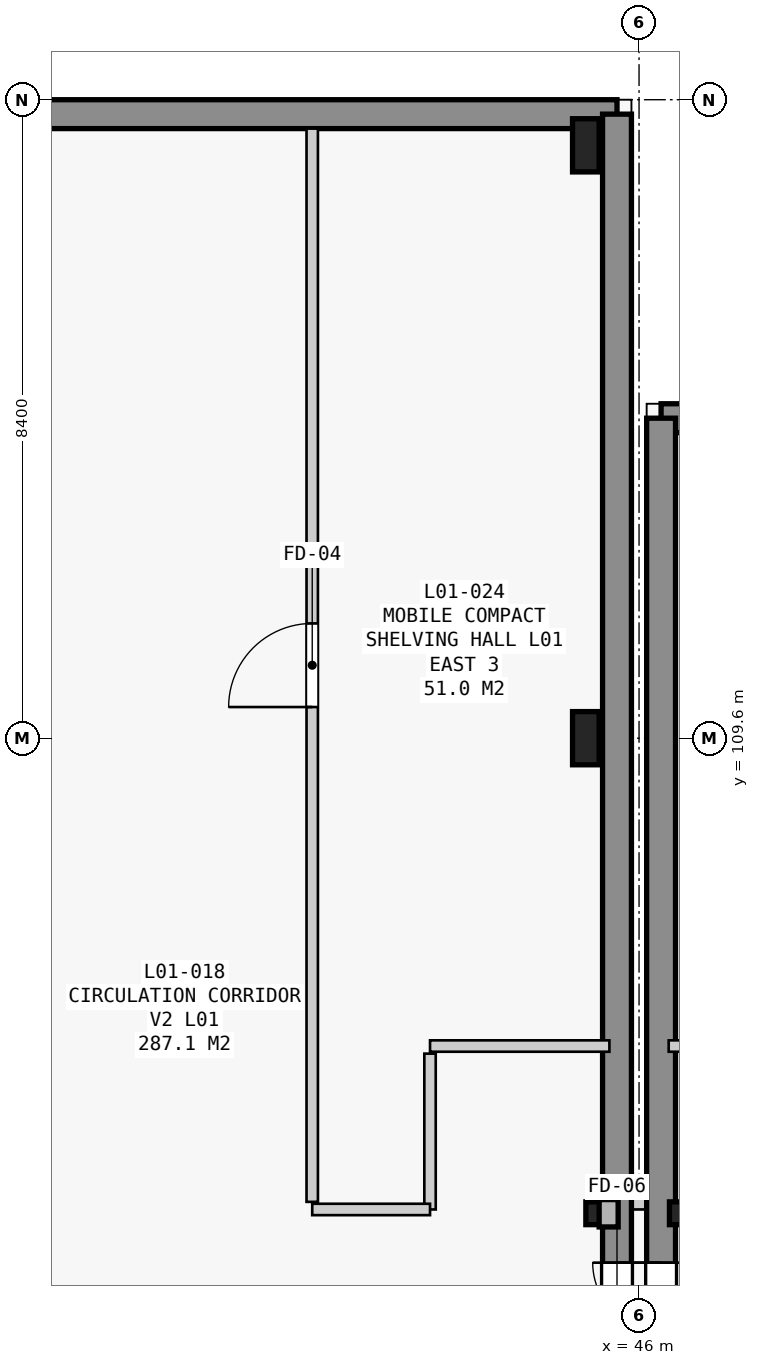
"""IFC4 building model, lengths in metres.
Left out: names, types, materials, properties, quantities, classifications, styles, units other than length and angle.
Written with IfcOpenShell. Run it as: python <this file> out.ifc"""

import sys

from ifc_helpers import new_model, si_unit, direction, frame, frame_2d, origin, origin_2d, place, context, subcontext, project, spatial, rectangle, i_section, extrude, element, fill, save


model = new_model("IFC4")
c1 = context("Model", 3, precision=1e-05, world=origin(), true_north=direction((0.0, 1.0)))
c2 = subcontext(c1, "Body", "Model", "MODEL_VIEW")
j1 = project(units=[si_unit("LENGTHUNIT", "METRE"), si_unit("PLANEANGLEUNIT", "RADIAN")], contexts=[c1])
p1 = place(None, origin())
s1 = spatial("IfcSite", under=j1, at=p1, CompositionType="ELEMENT")
p2 = place(p1, origin())
s2 = spatial("IfcBuilding", under=s1, at=p2, CompositionType="ELEMENT")
p3 = place(p2, frame((0.0, 0.0, 5.4)))
s3 = spatial("IfcBuildingStorey", under=s2, at=p3, CompositionType="ELEMENT", Elevation=5.4)
for number, where, z_axis, x_axis in (
    (1, (45.3, 109.6, 0.0), (0.0, 0.0, 1.0), (1.0, 0.0, 0.0)),
    (2, (45.3, 117.4, 0.0), (0.0, 0.0, 1.0), (1.0, 0.0, 0.0)),
):
    element("IfcColumn", number, at=place(p3, frame(where, z_axis=z_axis, x_axis=x_axis)), inside=s3, PredefinedType="COLUMN", context=c2, shape_type="SweptSolid", body=[
        extrude(rectangle(XDim=0.35, YDim=0.7, at=origin_2d()), origin(), (0.0, 0.0, 1.0), 4.2),
    ])
for number, where, z_axis, x_axis in (
    (3, (45.45, 103.35, 0.0), (0.0, 0.0, 1.0), (1.0, 0.0, 0.0)),
    (4, (46.55, 103.35, 0.0), (0.0, 0.0, 1.0), (1.0, 0.0, 0.0)),
):
    element("IfcColumn", number, at=place(p3, frame(where, z_axis=z_axis, x_axis=x_axis)), inside=s3, PredefinedType="COLUMN", context=c2, shape_type="SweptSolid", body=[
        extrude(i_section(OverallWidth=0.3, OverallDepth=0.3, WebThickness=0.011, FlangeThickness=0.019, FilletRadius=0.027, at=origin_2d()), origin(), (0.0, 0.0, 1.0), 4.2),
    ])
p4 = place(p3, frame((45.9, 103.5, 0.0), z_axis=(0.0, 0.0, 1.0), x_axis=(1.0, 0.0, 0.0)))
e5 = element("IfcWall", 5, at=p4, inside=s3, PredefinedType="STANDARD", context=c2, shape_type="SweptSolid", body=[
    extrude(rectangle(XDim=0.2, YDim=0.2, at=frame_2d((0.1, 0.0))), origin(), (0.0, 0.0, 1.0), 3.94),
])
p5 = place(p3, frame((12.59, 117.81, 0.0), z_axis=(0.0, 0.0, 1.0), x_axis=(1.0, 0.0, 0.0)))
e6 = element("IfcWall", 6, at=p5, inside=s3, PredefinedType="STANDARD", context=c2, shape_type="SweptSolid", body=[
    extrude(rectangle(XDim=33.12, YDim=0.38, at=frame_2d((16.56, 0.0))), origin(), (0.0, 0.0, 1.0), 3.88),
])
p6 = place(p3, frame((45.71, 117.81, 0.0), z_axis=(0.0, 0.0, 1.0), x_axis=(0.0, -1.0, 0.0)))
e7 = element("IfcWall", 7, at=p6, inside=s3, PredefinedType="STANDARD", context=c2, shape_type="SweptSolid", body=[
    extrude(rectangle(XDim=41.52, YDim=0.38, at=frame_2d((20.76, 0.0))), origin(), (0.0, 0.0, 1.0), 3.88),
])
p7 = place(p6, frame((15.11, 0.0, 0.0)))
e8 = element("IfcOpeningElement", 8, at=p7, cuts=e7, PredefinedType="OPENING", context=c2, shape_type="SweptSolid", body=[
    extrude(rectangle(XDim=1.8, YDim=2.2, at=frame_2d((0.9, 1.1))), frame((0.0, 0.2, 0.0), z_axis=(0.0, -1.0, 0.0), x_axis=(1.0, 0.0, 0.0)), (0.0, 0.0, 1.0), 0.4),
])
p8 = place(p3, frame((46.29, 113.81, 0.0), z_axis=(0.0, 0.0, 1.0), x_axis=(1.0, 0.0, 0.0)))
e9 = element("IfcWall", 9, at=p8, inside=s3, PredefinedType="STANDARD", context=c2, shape_type="SweptSolid", body=[
    extrude(rectangle(XDim=78.32, YDim=0.38, at=frame_2d((39.16, 0.0))), origin(), (0.0, 0.0, 1.0), 3.92),
])
p9 = place(p8, frame((23.029, 0.0, 1.65)))
e10 = element("IfcOpeningElement", 10, at=p9, cuts=e9, PredefinedType="OPENING", context=c2, shape_type="SweptSolid", body=[
    extrude(rectangle(XDim=2.4, YDim=1.8, at=frame_2d((1.2, 0.9))), frame((0.0, 0.2, 0.0), z_axis=(0.0, -1.0, 0.0), x_axis=(1.0, 0.0, 0.0)), (0.0, 0.0, 1.0), 0.4),
])
p10 = place(p8, frame((50.866, 0.0, 1.05)))
e11 = element("IfcOpeningElement", 11, at=p10, cuts=e9, PredefinedType="OPENING", context=c2, shape_type="SweptSolid", body=[
    extrude(rectangle(XDim=1.65, YDim=2.2, at=frame_2d((0.825, 1.1))), frame((0.0, 0.2, 0.0), z_axis=(0.0, -1.0, 0.0), x_axis=(1.0, 0.0, 0.0)), (0.0, 0.0, 1.0), 0.4),
])
p11 = place(p3, frame((46.29, 76.29, 0.0), z_axis=(0.0, 0.0, 1.0), x_axis=(0.0, 1.0, 0.0)))
e12 = element("IfcWall", 12, at=p11, inside=s3, PredefinedType="STANDARD", context=c2, shape_type="SweptSolid", body=[
    extrude(rectangle(XDim=37.52, YDim=0.38, at=frame_2d((18.76, 0.0))), origin(), (0.0, 0.0, 1.0), 3.92),
])
p12 = place(p11, frame((24.61, 0.0, 0.0)))
e13 = element("IfcOpeningElement", 13, at=p12, cuts=e12, PredefinedType="OPENING", context=c2, shape_type="SweptSolid", body=[
    extrude(rectangle(XDim=1.8, YDim=2.2, at=frame_2d((0.9, 1.1))), frame((0.0, 0.2, 0.0), z_axis=(0.0, -1.0, 0.0), x_axis=(1.0, 0.0, 0.0)), (0.0, 0.0, 1.0), 0.4),
])
p13 = place(p3, frame((45.61, 105.55, 0.0), z_axis=(0.0, 0.0, 1.0), x_axis=(-1.0, 0.0, 0.0)))
e14 = element("IfcWall", 14, at=p13, inside=s3, PredefinedType="PARTITIONING", context=c2, shape_type="SweptSolid", body=[
    extrude(rectangle(XDim=2.36, YDim=0.15, at=frame_2d((1.18, 0.0))), origin(), (0.0, 0.0, 1.0), 3.11),
])
p14 = place(p3, frame((43.25, 105.45, 0.0), z_axis=(0.0, 0.0, 1.0), x_axis=(0.0, -1.0, 0.0)))
e15 = element("IfcWall", 15, at=p14, inside=s3, PredefinedType="PARTITIONING", context=c2, shape_type="SweptSolid", body=[
    extrude(rectangle(XDim=2.05, YDim=0.15, at=frame_2d((1.025, 0.0))), origin(), (0.0, 0.0, 1.0), 3.88),
])
p15 = place(p3, frame((43.25, 103.4, 0.0), z_axis=(0.0, 0.0, 1.0), x_axis=(-1.0, 0.0, 0.0)))
e16 = element("IfcWall", 16, at=p15, inside=s3, PredefinedType="PARTITIONING", context=c2, shape_type="SweptSolid", body=[
    extrude(rectangle(XDim=1.55, YDim=0.15, at=frame_2d((0.775, 0.0))), origin(), (0.0, 0.0, 1.0), 3.88),
])
p16 = place(p3, frame((41.7, 103.5, 0.0), z_axis=(0.0, 0.0, 1.0), x_axis=(0.0, 1.0, 0.0)))
e17 = element("IfcWall", 17, at=p16, inside=s3, PredefinedType="PARTITIONING", context=c2, shape_type="SweptSolid", body=[
    extrude(rectangle(XDim=14.12, YDim=0.15, at=frame_2d((7.06, 0.0))), origin(), (0.0, 0.0, 1.0), 3.01),
])
p17 = place(p16, frame((6.51, 0.0, 0.0)))
e18 = element("IfcOpeningElement", 18, at=p17, cuts=e17, PredefinedType="OPENING", context=c2, shape_type="SweptSolid", body=[
    extrude(rectangle(XDim=1.1, YDim=2.15, at=frame_2d((0.55, 1.075))), frame((0.0, 0.085, 0.0), z_axis=(0.0, -1.0, 0.0), x_axis=(1.0, 0.0, 0.0)), (0.0, 0.0, 1.0), 0.17),
])
p18 = place(p3, frame((48.65, 105.55, 0.0), z_axis=(0.0, 0.0, 1.0), x_axis=(-1.0, 0.0, 0.0)))
e19 = element("IfcWall", 19, at=p18, inside=s3, PredefinedType="PARTITIONING", context=c2, shape_type="SweptSolid", body=[
    extrude(rectangle(XDim=2.26, YDim=0.15, at=frame_2d((1.13, 0.0))), origin(), (0.0, 0.0, 1.0), 2.715),
])
p19 = place(p7, origin())
e20 = element("IfcDoor", 20, at=p19, inside=s3, OperationType="DOUBLE_DOOR_SINGLE_SWING", PredefinedType="DOOR", context=c2, shape_type="SweptSolid", body=[
    extrude(rectangle(XDim=1.8, YDim=2.2, at=frame_2d((0.9, 1.1))), frame((0.0, 0.025, 0.0), z_axis=(0.0, -1.0, 0.0), x_axis=(1.0, 0.0, 0.0)), (0.0, 0.0, 1.0), 0.05),
])
fill(e8, e20)
p20 = place(p12, origin())
e21 = element("IfcDoor", 21, at=p20, inside=s3, OperationType="DOUBLE_DOOR_SINGLE_SWING", PredefinedType="DOOR", context=c2, shape_type="SweptSolid", body=[
    extrude(rectangle(XDim=1.8, YDim=2.2, at=frame_2d((0.9, 1.1))), frame((0.0, 0.025, 0.0), z_axis=(0.0, -1.0, 0.0), x_axis=(1.0, 0.0, 0.0)), (0.0, 0.0, 1.0), 0.05),
])
fill(e13, e21)
p21 = place(p17, origin())
e22 = element("IfcDoor", 22, at=p21, inside=s3, OperationType="SINGLE_SWING_LEFT", PredefinedType="DOOR", context=c2, shape_type="SweptSolid", body=[
    extrude(rectangle(XDim=1.1, YDim=2.15, at=frame_2d((0.55, 1.075))), frame((0.0, 0.025, 0.0), z_axis=(0.0, -1.0, 0.0), x_axis=(1.0, 0.0, 0.0)), (0.0, 0.0, 1.0), 0.05),
])
fill(e18, e22)
save(model, sys.argv[1])
